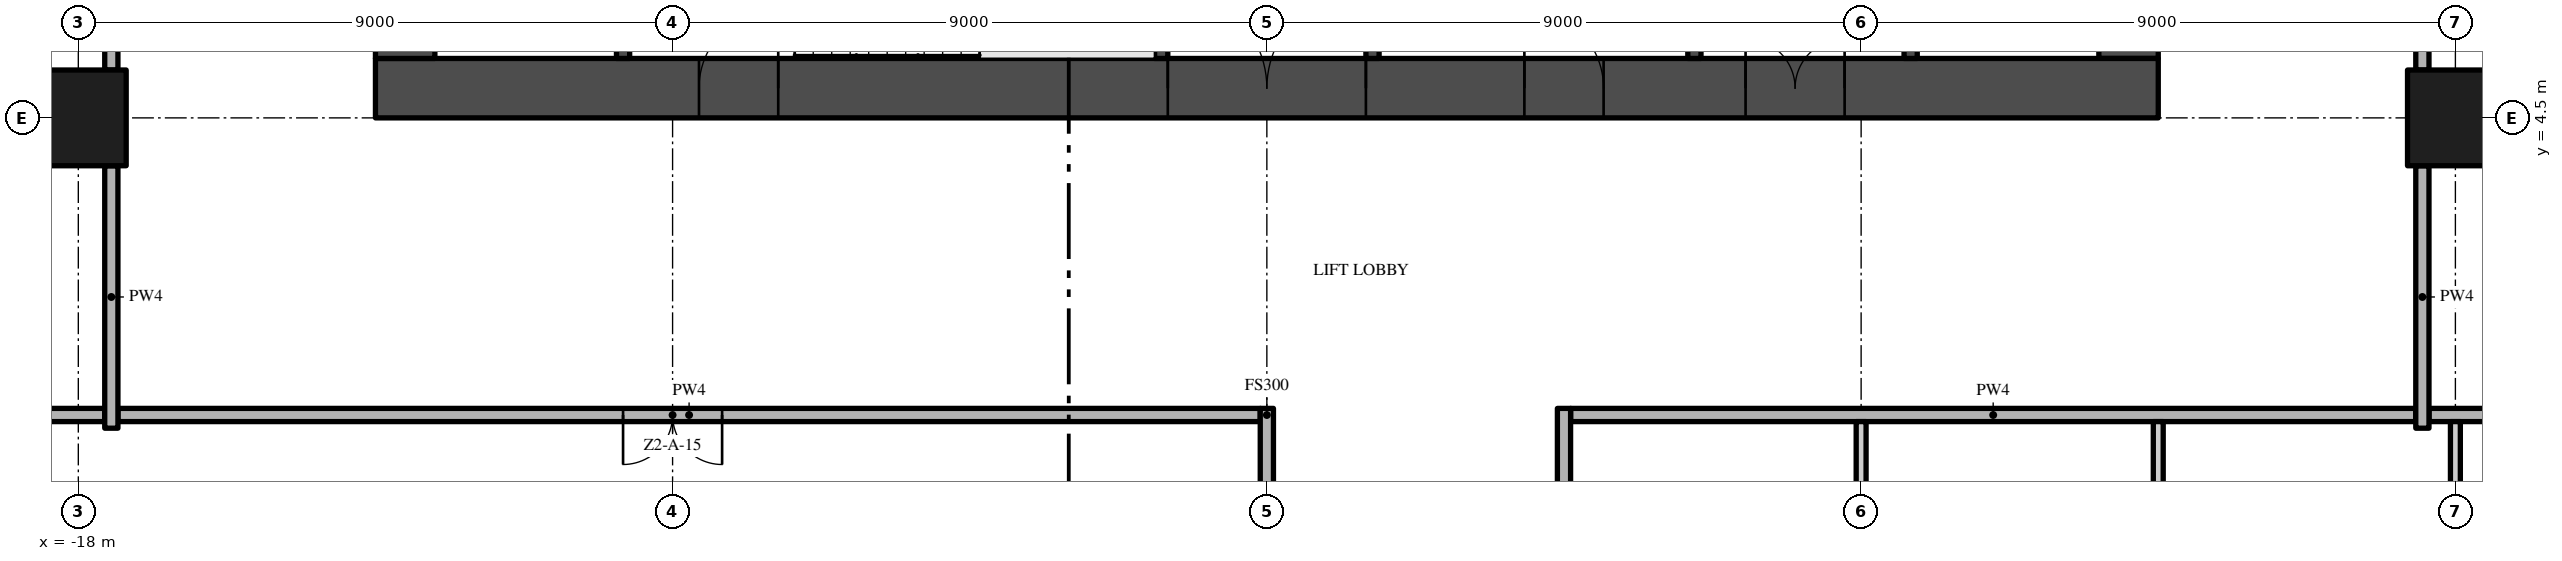
"""IFC4 building model, lengths in metres.
Left out: names, types, materials, properties, quantities, classifications, styles, units other than length and angle.
Written with IfcOpenShell. Run it as: python <this file> out.ifc"""

import sys

from ifc_helpers import new_model, si_unit, direction, frame, frame_2d, origin, origin_2d, place, context, subcontext, project, spatial, rectangle, extrude, element, fill, save


model = new_model("IFC4")
c1 = context("Model", 3, precision=1e-05, world=origin(), true_north=direction((0.0, 1.0)))
c2 = subcontext(c1, "Body", "Model", "MODEL_VIEW")
j1 = project(units=[si_unit("LENGTHUNIT", "METRE"), si_unit("PLANEANGLEUNIT", "RADIAN")], contexts=[c1])
p1 = place(None, origin())
s1 = spatial("IfcSite", under=j1, at=p1, CompositionType="ELEMENT")
p2 = place(p1, origin())
s2 = spatial("IfcBuilding", under=s1, at=p2, CompositionType="ELEMENT")
p3 = place(p2, frame((0.0, 0.0, 69.4)))
s3 = spatial("IfcBuildingStorey", under=s2, at=p3, CompositionType="ELEMENT", Elevation=69.4)
p4 = place(p3, frame((-13.5, 4.95, -0.3), z_axis=(0.0, 0.0, 1.0), x_axis=(1.0, 0.0, 0.0)))
e1 = element("IfcWall", 1, at=p4, inside=s3, PredefinedType="SHEAR", context=c2, shape_type="SweptSolid", body=[
    extrude(rectangle(XDim=27.0, YDim=0.9, at=frame_2d((13.5, 0.0))), origin(), (0.0, 0.0, 1.0), 3.8),
])
p5 = place(p4, frame((12.0, 0.0, 0.3)))
e2 = element("IfcOpeningElement", 2, at=p5, cuts=e1, PredefinedType="OPENING", context=c2, shape_type="SweptSolid", body=[
    extrude(rectangle(XDim=3.0, YDim=2.4, at=frame_2d((1.5, 1.2))), frame((0.0, 0.46, 0.0), z_axis=(0.0, -1.0, 0.0), x_axis=(1.0, 0.0, 0.0)), (0.0, 0.0, 1.0), 0.92),
])
p6 = place(p4, frame((4.9, 0.0, 0.3)))
e3 = element("IfcOpeningElement", 3, at=p6, cuts=e1, PredefinedType="OPENING", context=c2, shape_type="SweptSolid", body=[
    extrude(rectangle(XDim=1.2, YDim=2.2, at=frame_2d((0.6, 1.1))), frame((0.0, 0.46, 0.0), z_axis=(0.0, -1.0, 0.0), x_axis=(1.0, 0.0, 0.0)), (0.0, 0.0, 1.0), 0.92),
])
p7 = place(p4, frame((20.75, 0.0, 0.3)))
e4 = element("IfcOpeningElement", 4, at=p7, cuts=e1, PredefinedType="OPENING", context=c2, shape_type="SweptSolid", body=[
    extrude(rectangle(XDim=1.5, YDim=2.2, at=frame_2d((0.75, 1.1))), frame((0.0, 0.46, 0.0), z_axis=(0.0, -1.0, 0.0), x_axis=(1.0, 0.0, 0.0)), (0.0, 0.0, 1.0), 0.92),
])
p8 = place(p4, frame((17.4, 0.0, 0.3)))
e5 = element("IfcOpeningElement", 5, at=p8, cuts=e1, PredefinedType="OPENING", context=c2, shape_type="SweptSolid", body=[
    extrude(rectangle(XDim=1.2, YDim=2.2, at=frame_2d((0.6, 1.1))), frame((0.0, 0.46, 0.0), z_axis=(0.0, -1.0, 0.0), x_axis=(1.0, 0.0, 0.0)), (0.0, 0.0, 1.0), 0.92),
])
p9 = place(p3, frame((13.05, 5.4, -0.3), z_axis=(0.0, 0.0, 1.0), x_axis=(0.0, 1.0, 0.0)))
e6 = element("IfcWall", 6, at=p9, inside=s3, PredefinedType="SHEAR", context=c2, shape_type="SweptSolid", body=[
    extrude(rectangle(XDim=16.2, YDim=0.9, at=frame_2d((8.1, 0.0))), origin(), (0.0, 0.0, 1.0), 3.8),
])
p10 = place(p9, frame((6.0, 0.0, 0.3)))
e7 = element("IfcOpeningElement", 7, at=p10, cuts=e6, PredefinedType="OPENING", context=c2, shape_type="SweptSolid", body=[
    extrude(rectangle(XDim=1.2, YDim=2.2, at=frame_2d((0.6, 1.1))), frame((0.0, 0.46, 0.0), z_axis=(0.0, -1.0, 0.0), x_axis=(1.0, 0.0, 0.0)), (0.0, 0.0, 1.0), 0.92),
])
p11 = place(p3, frame((-13.05, 21.6, -0.3), z_axis=(0.0, 0.0, 1.0), x_axis=(0.0, -1.0, 0.0)))
e8 = element("IfcWall", 8, at=p11, inside=s3, PredefinedType="SHEAR", context=c2, shape_type="SweptSolid", body=[
    extrude(rectangle(XDim=16.2, YDim=0.9, at=frame_2d((8.1, 0.0))), origin(), (0.0, 0.0, 1.0), 3.8),
])
p12 = place(p11, frame((9.0, 0.0, 0.3)))
e9 = element("IfcOpeningElement", 9, at=p12, cuts=e8, PredefinedType="OPENING", context=c2, shape_type="SweptSolid", body=[
    extrude(rectangle(XDim=1.2, YDim=2.2, at=frame_2d((0.6, 1.1))), frame((0.0, 0.46, 0.0), z_axis=(0.0, -1.0, 0.0), x_axis=(1.0, 0.0, 0.0)), (0.0, 0.0, 1.0), 0.92),
])
for number, where, z_axis, x_axis in (
    (10, (-18.0, 4.5, 0.0), (0.0, 0.0, 1.0), (1.0, 0.0, 0.0)),
    (11, (18.0, 4.5, 0.0), (0.0, 0.0, 1.0), (1.0, 0.0, 0.0)),
):
    element("IfcColumn", number, at=place(p3, frame(where, z_axis=z_axis, x_axis=x_axis)), inside=s3, PredefinedType="COLUMN", context=c2, shape_type="SweptSolid", body=[
        extrude(rectangle(XDim=1.45, YDim=1.45, at=origin_2d()), origin(), (0.0, 0.0, 1.0), 3.5),
    ])
for number, where, z_axis, x_axis in (
    (12, (-9.75, 5.4, 0.0), (0.0, 0.0, 1.0), (0.0, 1.0, 0.0)),
    (13, (-1.6, 5.4, 0.0), (0.0, 0.0, 1.0), (0.0, 1.0, 0.0)),
):
    element("IfcWall", number, at=place(p3, frame(where, z_axis=z_axis, x_axis=x_axis)), inside=s3, PredefinedType="SHEAR", context=c2, shape_type="SweptSolid", body=[
        extrude(rectangle(XDim=2.55, YDim=0.2, at=frame_2d((1.275, 0.0))), origin(), (0.0, 0.0, 1.0), 3.5),
    ])
p13 = place(p3, frame((1.6, 11.5, 0.0), z_axis=(0.0, 0.0, 1.0), x_axis=(0.0, -1.0, 0.0)))
e14 = element("IfcWall", 14, at=p13, inside=s3, PredefinedType="SHEAR", context=c2, shape_type="SweptSolid", body=[
    extrude(rectangle(XDim=6.1, YDim=0.2, at=frame_2d((3.05, 0.0))), origin(), (0.0, 0.0, 1.0), 3.5),
])
p14 = place(p13, frame((2.2, 0.0, 0.0)))
e15 = element("IfcOpeningElement", 15, at=p14, cuts=e14, PredefinedType="OPENING", context=c2, shape_type="SweptSolid", body=[
    extrude(rectangle(XDim=0.9, YDim=2.1, at=frame_2d((0.45, 1.05))), frame((0.0, 0.11, 0.0), z_axis=(0.0, -1.0, 0.0), x_axis=(1.0, 0.0, 0.0)), (0.0, 0.0, 1.0), 0.22),
])
p15 = place(p3, frame((6.475, 5.4, 0.0), z_axis=(0.0, 0.0, 1.0), x_axis=(0.0, 1.0, 0.0)))
e16 = element("IfcWall", 16, at=p15, inside=s3, PredefinedType="SHEAR", context=c2, shape_type="SweptSolid", body=[
    extrude(rectangle(XDim=6.1, YDim=0.2, at=frame_2d((3.05, 0.0))), origin(), (0.0, 0.0, 1.0), 3.5),
])
p16 = place(p3, frame((9.75, 5.4, 0.0), z_axis=(0.0, 0.0, 1.0), x_axis=(0.0, 1.0, 0.0)))
e17 = element("IfcWall", 17, at=p16, inside=s3, PredefinedType="SHEAR", context=c2, shape_type="SweptSolid", body=[
    extrude(rectangle(XDim=2.2, YDim=0.2, at=frame_2d((1.1, 0.0))), origin(), (0.0, 0.0, 1.0), 3.5),
])
p17 = place(p16, frame((0.55, 0.0, 0.0)))
e18 = element("IfcOpeningElement", 18, at=p17, cuts=e17, PredefinedType="OPENING", context=c2, shape_type="SweptSolid", body=[
    extrude(rectangle(XDim=1.1, YDim=2.1, at=frame_2d((0.55, 1.05))), frame((0.0, 0.11, 0.0), z_axis=(0.0, -1.0, 0.0), x_axis=(1.0, 0.0, 0.0)), (0.0, 0.0, 1.0), 0.22),
])
p18 = place(p3, frame((-0.1, 0.0, 0.0), z_axis=(0.0, 0.0, 1.0), x_axis=(-1.0, 0.0, 0.0)))
e19 = element("IfcWall", 19, at=p18, inside=s3, PredefinedType="PARTITIONING", context=c2, shape_type="SweptSolid", body=[
    extrude(rectangle(XDim=17.3, YDim=0.2, at=frame_2d((8.65, 0.0))), origin(), (0.0, 0.0, 1.0), 3.5),
])
p19 = place(p18, frame((8.15, 0.0, 0.0)))
e20 = element("IfcOpeningElement", 20, at=p19, cuts=e19, PredefinedType="OPENING", context=c2, shape_type="SweptSolid", body=[
    extrude(rectangle(XDim=1.5, YDim=2.4, at=frame_2d((0.75, 1.2))), frame((0.0, 0.11, 0.0), z_axis=(0.0, -1.0, 0.0), x_axis=(1.0, 0.0, 0.0)), (0.0, 0.0, 1.0), 0.22),
])
p20 = place(p3, frame((4.6, 0.0, 0.0), z_axis=(0.0, 0.0, 1.0), x_axis=(1.0, 0.0, 0.0)))
e21 = element("IfcWall", 21, at=p20, inside=s3, PredefinedType="PARTITIONING", context=c2, shape_type="SweptSolid", body=[
    extrude(rectangle(XDim=12.8, YDim=0.2, at=frame_2d((6.4, 0.0))), origin(), (0.0, 0.0, 1.0), 3.5),
])
for number, where, z_axis, x_axis in (
    (22, (-26.7, 0.0, 0.0), (0.0, 0.0, 1.0), (1.0, 0.0, 0.0)),
    (23, (17.6, 0.0, 0.0), (0.0, 0.0, 1.0), (1.0, 0.0, 0.0)),
):
    element("IfcWall", number, at=place(p3, frame(where, z_axis=z_axis, x_axis=x_axis)), inside=s3, PredefinedType="PARTITIONING", context=c2, shape_type="SweptSolid", body=[
        extrude(rectangle(XDim=9.1, YDim=0.2, at=frame_2d((4.55, 0.0))), origin(), (0.0, 0.0, 1.0), 3.5),
    ])
p21 = place(p3, frame((-17.5, -0.2, 0.0), z_axis=(0.0, 0.0, 1.0), x_axis=(0.0, 1.0, 0.0)))
e24 = element("IfcWall", 24, at=p21, inside=s3, PredefinedType="PARTITIONING", context=c2, shape_type="SweptSolid", body=[
    extrude(rectangle(XDim=3.975, YDim=0.2, at=frame_2d((1.988, 0.0))), origin(), (0.0, 0.0, 1.0), 3.5),
])
p22 = place(p3, frame((-17.5, 5.225, 0.0), z_axis=(0.0, 0.0, 1.0), x_axis=(0.0, 1.0, 0.0)))
e25 = element("IfcWall", 25, at=p22, inside=s3, PredefinedType="PARTITIONING", context=c2, shape_type="SweptSolid", body=[
    extrude(rectangle(XDim=7.55, YDim=0.2, at=frame_2d((3.775, 0.0))), origin(), (0.0, 0.0, 1.0), 3.5),
])
p23 = place(p3, frame((0.0, -3.775, 0.0), z_axis=(0.0, 0.0, 1.0), x_axis=(0.0, 1.0, 0.0)))
e26 = element("IfcWall", 26, at=p23, inside=s3, PredefinedType="PARTITIONING", context=c2, shape_type="SweptSolid", body=[
    extrude(rectangle(XDim=3.875, YDim=0.2, at=frame_2d((1.938, 0.0))), origin(), (0.0, 0.0, 1.0), 3.5),
])
p24 = place(p3, frame((4.5, 0.1, 0.0), z_axis=(0.0, 0.0, 1.0), x_axis=(0.0, -1.0, 0.0)))
e27 = element("IfcWall", 27, at=p24, inside=s3, PredefinedType="PARTITIONING", context=c2, shape_type="SweptSolid", body=[
    extrude(rectangle(XDim=22.3, YDim=0.2, at=frame_2d((11.15, 0.0))), origin(), (0.0, 0.0, 1.0), 3.5),
])
p25 = place(p24, frame((10.6, 0.0, 0.0)))
e28 = element("IfcOpeningElement", 28, at=p25, cuts=e27, PredefinedType="OPENING", context=c2, shape_type="SweptSolid", body=[
    extrude(rectangle(XDim=1.5, YDim=2.4, at=frame_2d((0.75, 1.2))), frame((0.0, 0.11, 0.0), z_axis=(0.0, -1.0, 0.0), x_axis=(1.0, 0.0, 0.0)), (0.0, 0.0, 1.0), 0.22),
])
p26 = place(p3, frame((9.0, -0.1, 0.0), z_axis=(0.0, 0.0, 1.0), x_axis=(0.0, -1.0, 0.0)))
e29 = element("IfcWall", 29, at=p26, inside=s3, PredefinedType="PARTITIONING", context=c2, shape_type="SweptSolid", body=[
    extrude(rectangle(XDim=3.675, YDim=0.15, at=frame_2d((1.837, 0.0))), origin(), (0.0, 0.0, 1.0), 3.5),
])
p27 = place(p26, frame((0.95, 0.0, 0.0)))
e30 = element("IfcOpeningElement", 30, at=p27, cuts=e29, PredefinedType="OPENING", context=c2, shape_type="SweptSolid", body=[
    extrude(rectangle(XDim=0.9, YDim=2.1, at=frame_2d((0.45, 1.05))), frame((0.0, 0.085, 0.0), z_axis=(0.0, -1.0, 0.0), x_axis=(1.0, 0.0, 0.0)), (0.0, 0.0, 1.0), 0.17),
])
p28 = place(p3, frame((13.5, -6.075, 0.0), z_axis=(0.0, 0.0, 1.0), x_axis=(0.0, 1.0, 0.0)))
e31 = element("IfcWall", 31, at=p28, inside=s3, PredefinedType="PARTITIONING", context=c2, shape_type="SweptSolid", body=[
    extrude(rectangle(XDim=5.975, YDim=0.15, at=frame_2d((2.987, 0.0))), origin(), (0.0, 0.0, 1.0), 3.5),
])
p29 = place(p28, frame((1.175, 0.0, 0.0)))
e32 = element("IfcOpeningElement", 32, at=p29, cuts=e31, PredefinedType="OPENING", context=c2, shape_type="SweptSolid", body=[
    extrude(rectangle(XDim=0.8, YDim=2.0, at=frame_2d((0.4, 1.0))), frame((0.0, 0.085, 0.0), z_axis=(0.0, -1.0, 0.0), x_axis=(1.0, 0.0, 0.0)), (0.0, 0.0, 1.0), 0.17),
])
p30 = place(p3, frame((17.5, -0.2, 0.0), z_axis=(0.0, 0.0, 1.0), x_axis=(0.0, 1.0, 0.0)))
e33 = element("IfcWall", 33, at=p30, inside=s3, PredefinedType="PARTITIONING", context=c2, shape_type="SweptSolid", body=[
    extrude(rectangle(XDim=3.975, YDim=0.2, at=frame_2d((1.988, 0.0))), origin(), (0.0, 0.0, 1.0), 3.5),
])
p31 = place(p3, frame((17.5, 12.775, 0.0), z_axis=(0.0, 0.0, 1.0), x_axis=(0.0, -1.0, 0.0)))
e34 = element("IfcWall", 34, at=p31, inside=s3, PredefinedType="PARTITIONING", context=c2, shape_type="SweptSolid", body=[
    extrude(rectangle(XDim=7.55, YDim=0.2, at=frame_2d((3.775, 0.0))), origin(), (0.0, 0.0, 1.0), 3.5),
])
p32 = place(p31, frame((3.175, 0.0, 0.0)))
e35 = element("IfcOpeningElement", 35, at=p32, cuts=e34, PredefinedType="OPENING", context=c2, shape_type="SweptSolid", body=[
    extrude(rectangle(XDim=1.2, YDim=2.4, at=frame_2d((0.6, 1.2))), frame((0.0, 0.11, 0.0), z_axis=(0.0, -1.0, 0.0), x_axis=(1.0, 0.0, 0.0)), (0.0, 0.0, 1.0), 0.22),
])
p33 = place(p3, frame((18.0, -0.1, 0.0), z_axis=(0.0, 0.0, 1.0), x_axis=(0.0, -1.0, 0.0)))
e36 = element("IfcWall", 36, at=p33, inside=s3, PredefinedType="PARTITIONING", context=c2, shape_type="SweptSolid", body=[
    extrude(rectangle(XDim=3.675, YDim=0.15, at=frame_2d((1.837, 0.0))), origin(), (0.0, 0.0, 1.0), 3.5),
])
p34 = place(p33, frame((1.675, 0.0, 0.0)))
e37 = element("IfcOpeningElement", 37, at=p34, cuts=e36, PredefinedType="OPENING", context=c2, shape_type="SweptSolid", body=[
    extrude(rectangle(XDim=1.0, YDim=2.4, at=frame_2d((0.5, 1.2))), frame((0.0, 0.085, 0.0), z_axis=(0.0, -1.0, 0.0), x_axis=(1.0, 0.0, 0.0)), (0.0, 0.0, 1.0), 0.17),
])
p35 = place(p5, frame((3.0, 0.0, 0.0), z_axis=(0.0, 0.0, 1.0), x_axis=(-1.0, 0.0, 0.0)))
e38 = element("IfcDoor", 38, at=p35, inside=s3, OperationType="DOUBLE_DOOR_SINGLE_SWING", PredefinedType="DOOR", context=c2, shape_type="SweptSolid", body=[
    extrude(rectangle(XDim=3.0, YDim=2.4, at=frame_2d((1.5, 1.2))), frame((0.0, 0.025, 0.0), z_axis=(0.0, -1.0, 0.0), x_axis=(1.0, 0.0, 0.0)), (0.0, 0.0, 1.0), 0.05),
])
fill(e2, e38)
p36 = place(p6, frame((1.2, 0.0, 0.0), z_axis=(0.0, 0.0, 1.0), x_axis=(-1.0, 0.0, 0.0)))
e39 = element("IfcDoor", 39, at=p36, inside=s3, OperationType="SINGLE_SWING_LEFT", PredefinedType="DOOR", context=c2, shape_type="SweptSolid", body=[
    extrude(rectangle(XDim=1.2, YDim=2.2, at=frame_2d((0.6, 1.1))), frame((0.0, 0.025, 0.0), z_axis=(0.0, -1.0, 0.0), x_axis=(1.0, 0.0, 0.0)), (0.0, 0.0, 1.0), 0.05),
])
fill(e3, e39)
p37 = place(p7, frame((1.5, 0.0, 0.0), z_axis=(0.0, 0.0, 1.0), x_axis=(-1.0, 0.0, 0.0)))
e40 = element("IfcDoor", 40, at=p37, inside=s3, OperationType="DOUBLE_DOOR_SINGLE_SWING", PredefinedType="DOOR", context=c2, shape_type="SweptSolid", body=[
    extrude(rectangle(XDim=1.5, YDim=2.2, at=frame_2d((0.75, 1.1))), frame((0.0, 0.025, 0.0), z_axis=(0.0, -1.0, 0.0), x_axis=(1.0, 0.0, 0.0)), (0.0, 0.0, 1.0), 0.05),
])
fill(e4, e40)
p38 = place(p8, frame((1.2, 0.0, 0.0), z_axis=(0.0, 0.0, 1.0), x_axis=(-1.0, 0.0, 0.0)))
e41 = element("IfcDoor", 41, at=p38, inside=s3, OperationType="SINGLE_SWING_RIGHT", PredefinedType="DOOR", context=c2, shape_type="SweptSolid", body=[
    extrude(rectangle(XDim=1.2, YDim=2.2, at=frame_2d((0.6, 1.1))), frame((0.0, 0.025, 0.0), z_axis=(0.0, -1.0, 0.0), x_axis=(1.0, 0.0, 0.0)), (0.0, 0.0, 1.0), 0.05),
])
fill(e5, e41)
p39 = place(p19, origin())
e42 = element("IfcDoor", 42, at=p39, inside=s3, OperationType="DOUBLE_DOOR_SINGLE_SWING", PredefinedType="DOOR", context=c2, shape_type="SweptSolid", body=[
    extrude(rectangle(XDim=1.5, YDim=2.4, at=frame_2d((0.75, 1.2))), frame((0.0, 0.025, 0.0), z_axis=(0.0, -1.0, 0.0), x_axis=(1.0, 0.0, 0.0)), (0.0, 0.0, 1.0), 0.05),
])
fill(e20, e42)
save(model, sys.argv[1])
